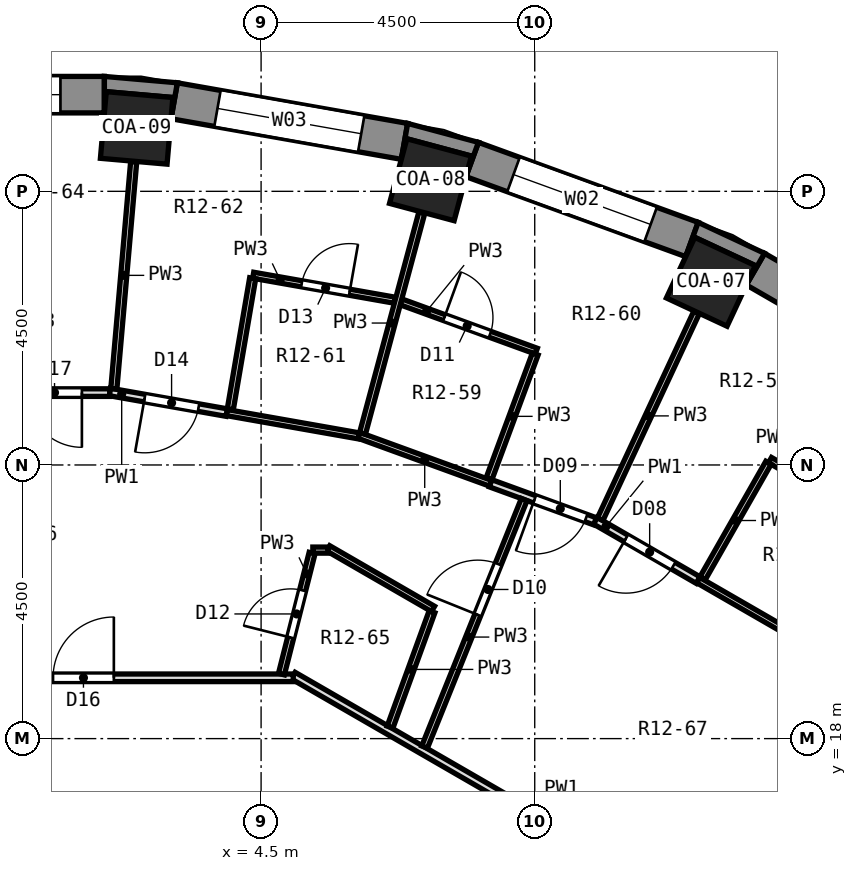
"""IFC4 building model, lengths in metres.
Left out: names, types, materials, properties, quantities, classifications, styles, units other than length and angle.
Written with IfcOpenShell. Run it as: python <this file> out.ifc"""

import sys

from ifc_helpers import new_model, si_unit, direction, frame, frame_2d, origin, origin_2d, place, context, subcontext, project, spatial, polyline, rectangle, outline, extrude, element, fill, save


model = new_model("IFC4")
c1 = context("Model", 3, precision=1e-05, world=origin(), true_north=direction((0.0, 1.0)))
c2 = subcontext(c1, "Body", "Model", "MODEL_VIEW")
j1 = project(units=[si_unit("LENGTHUNIT", "METRE"), si_unit("PLANEANGLEUNIT", "RADIAN")], contexts=[c1])
p1 = place(None, origin())
s1 = spatial("IfcSite", under=j1, at=p1, CompositionType="ELEMENT")
p2 = place(p1, origin())
s2 = spatial("IfcBuilding", under=s1, at=p2, CompositionType="ELEMENT")
p3 = place(p2, frame((0.0, 0.0, 56.0)))
s3 = spatial("IfcBuildingStorey", under=s2, at=p3, CompositionType="ELEMENT", Elevation=56.0)
for number, where, z_axis, x_axis in (
    (1, (11.897, 25.512, 0.0), (0.0, 0.0, 1.0), (0.423, 0.906, 0.0)),
    (2, (7.286, 27.191, 0.0), (0.0, 0.0, 1.0), (0.259, 0.966, 0.0)),
    (3, (2.453, 28.043, 0.0), (0.0, 0.0, 1.0), (0.087, 0.996, 0.0)),
):
    element("IfcColumn", number, at=place(p3, frame(where, z_axis=z_axis, x_axis=x_axis)), inside=s3, PredefinedType="COLUMN", context=c2, shape_type="SweptSolid", body=[
        extrude(rectangle(XDim=1.1, YDim=1.1, at=origin_2d()), origin(), (0.0, 0.0, 1.0), 3.3),
    ])
p4 = place(p3, frame((15.96, 23.798, 0.0), z_axis=(0.0, 0.0, 1.0), x_axis=(-0.86603124159, 0.499989888488, 0.0)))
e4 = element("IfcWall", 4, at=p4, inside=s3, PredefinedType="SOLIDWALL", context=c2, shape_type="SweptSolid", body=[
    extrude(rectangle(XDim=3.846, YDim=0.6, at=frame_2d((1.923, 0.0))), origin(), (0.0, 0.0, 1.0), 2.75),
])
p5 = place(p4, frame((0.723, 0.0, 0.9)))
e5 = element("IfcOpeningElement", 5, at=p5, cuts=e4, PredefinedType="OPENING", context=c2, shape_type="SweptSolid", body=[
    extrude(rectangle(XDim=2.4, YDim=1.8, at=frame_2d((1.2, 0.9))), frame((0.0, 0.312, 0.0), z_axis=(0.0, -1.0, 0.0), x_axis=(1.0, 0.0, 0.0)), (0.0, 0.0, 1.0), 0.624),
])
p6 = place(p3, frame((11.585, 26.208, 0.0), z_axis=(0.0, 0.0, 1.0), x_axis=(-0.939689588564, 0.342028474173, 0.0)))
e6 = element("IfcWall", 6, at=p6, inside=s3, PredefinedType="SOLIDWALL", context=c2, shape_type="SweptSolid", body=[
    extrude(rectangle(XDim=3.846, YDim=0.6, at=frame_2d((1.923, 0.0))), origin(), (0.0, 0.0, 1.0), 2.75),
])
p7 = place(p6, frame((0.723, 0.0, 0.9)))
e7 = element("IfcOpeningElement", 7, at=p7, cuts=e6, PredefinedType="OPENING", context=c2, shape_type="SweptSolid", body=[
    extrude(rectangle(XDim=2.4, YDim=1.8, at=frame_2d((1.2, 0.9))), frame((0.0, 0.312, 0.0), z_axis=(0.0, -1.0, 0.0), x_axis=(1.0, 0.0, 0.0)), (0.0, 0.0, 1.0), 0.624),
])
p8 = place(p3, frame((6.858, 27.821, 0.0), z_axis=(0.0, 0.0, 1.0), x_axis=(-0.984800809218, 0.173687553279, 0.0)))
e8 = element("IfcWall", 8, at=p8, inside=s3, PredefinedType="SOLIDWALL", context=c2, shape_type="SweptSolid", body=[
    extrude(rectangle(XDim=3.846, YDim=0.6, at=frame_2d((1.923, 0.0))), origin(), (0.0, 0.0, 1.0), 2.75),
])
p9 = place(p8, frame((0.723, 0.0, 0.9)))
e9 = element("IfcOpeningElement", 9, at=p9, cuts=e8, PredefinedType="OPENING", context=c2, shape_type="SweptSolid", body=[
    extrude(rectangle(XDim=2.4, YDim=1.8, at=frame_2d((1.2, 0.9))), frame((0.0, 0.312, 0.0), z_axis=(0.0, -1.0, 0.0), x_axis=(1.0, 0.0, 0.0)), (0.0, 0.0, 1.0), 0.624),
])
p10 = place(p3, frame((1.923, 28.59, 0.0), z_axis=(0.0, 0.0, 1.0), x_axis=(-1.0, 0.0, 0.0)))
e10 = element("IfcWall", 10, at=p10, inside=s3, PredefinedType="SOLIDWALL", context=c2, shape_type="SweptSolid", body=[
    extrude(rectangle(XDim=3.846, YDim=0.6, at=frame_2d((1.923, 0.0))), origin(), (0.0, 0.0, 1.0), 2.75),
])
p11 = place(p10, frame((0.723, 0.0, 0.9)))
e11 = element("IfcOpeningElement", 11, at=p11, cuts=e10, PredefinedType="OPENING", context=c2, shape_type="SweptSolid", body=[
    extrude(rectangle(XDim=2.4, YDim=1.8, at=frame_2d((1.2, 0.9))), frame((0.0, 0.312, 0.0), z_axis=(0.0, -1.0, 0.0), x_axis=(1.0, 0.0, 0.0)), (0.0, 0.0, 1.0), 0.624),
])
p12 = place(p3, origin())
e12 = element("IfcWall", 12, at=p12, inside=s3, PredefinedType="SOLIDWALL", context=c2, shape_type="SweptSolid", body=[
    extrude(outline(polyline([(11.688, 26.49), (11.483, 25.926), (11.631, 26.243), (12.628, 25.779), (12.479, 25.461), (12.78, 25.981), (11.688, 26.49)])), origin(), (0.0, 0.0, 1.0), 2.75),
])
p13 = place(p3, origin())
e13 = element("IfcWall", 13, at=p13, inside=s3, PredefinedType="SOLIDWALL", context=c2, shape_type="SweptSolid", body=[
    extrude(outline(polyline([(6.91, 28.117), (6.806, 27.526), (6.897, 27.865), (7.959, 27.58), (7.869, 27.241), (8.074, 27.805), (6.91, 28.117)])), origin(), (0.0, 0.0, 1.0), 2.75),
])
p14 = place(p3, origin())
e14 = element("IfcWall", 14, at=p14, inside=s3, PredefinedType="SOLIDWALL", context=c2, shape_type="SweptSolid", body=[
    extrude(outline(polyline([(3.123, 28.785), (1.923, 28.89), (1.923, 28.29), (1.954, 28.639), (3.049, 28.543), (3.019, 28.194), (3.123, 28.785)])), origin(), (0.0, 0.0, 1.0), 2.75),
])
p15 = place(p3, frame((5.029, 19.036, 0.0), z_axis=(0.0, 0.0, 1.0), x_axis=(0.866024825845, -0.50000100102, 0.0)))
e15 = element("IfcWall", 15, at=p15, inside=s3, PredefinedType="PARTITIONING", context=c2, shape_type="SweptSolid", body=[
    extrude(rectangle(XDim=10.192, YDim=0.125, at=frame_2d((5.096, 0.0))), origin(), (0.0, 0.0, 1.0), 2.75),
])
p16 = place(p3, frame((5.604, 21.129, 0.0), z_axis=(0.0, 0.0, 1.0), x_axis=(0.865901665176, -0.500214260339, 0.0)))
e16 = element("IfcWall", 16, at=p16, inside=s3, PredefinedType="PARTITIONING", context=c2, shape_type="SweptSolid", body=[
    extrude(rectangle(XDim=1.991, YDim=0.1, at=frame_2d((0.996, 0.0))), origin(), (0.0, 0.0, 1.0), 2.75),
])
p17 = place(p3, frame((11.687, 20.607, 0.0), z_axis=(0.0, 0.0, 1.0), x_axis=(0.866150561987, -0.499783156949, 0.0)))
e17 = element("IfcWall", 17, at=p17, inside=s3, PredefinedType="PARTITIONING", context=c2, shape_type="SweptSolid", body=[
    extrude(rectangle(XDim=2.205, YDim=0.1, at=frame_2d((1.103, 0.0))), origin(), (0.0, 0.0, 1.0), 2.75),
])
p18 = place(p3, frame((9.995, 21.584, 0.0), z_axis=(0.0, 0.0, 1.0), x_axis=(0.865996179119, -0.50005061519, 0.0)))
e18 = element("IfcWall", 18, at=p18, inside=s3, PredefinedType="PARTITIONING", context=c2, shape_type="SweptSolid", body=[
    extrude(rectangle(XDim=1.953, YDim=0.125, at=frame_2d((0.977, 0.0))), origin(), (0.0, 0.0, 1.0), 2.75),
])
p19 = place(p18, frame((0.583, 0.0, 0.0)))
e19 = element("IfcOpeningElement", 19, at=p19, cuts=e18, PredefinedType="OPENING", context=c2, shape_type="SweptSolid", body=[
    extrude(rectangle(XDim=0.9, YDim=2.1, at=frame_2d((0.45, 1.05))), frame((0.0, 0.074, 0.0), z_axis=(0.0, -1.0, 0.0), x_axis=(1.0, 0.0, 0.0)), (0.0, 0.0, 1.0), 0.149),
])
p20 = place(p3, frame((12.869, 22.58, 0.0), z_axis=(0.0, 0.0, 1.0), x_axis=(0.866116947413, -0.499841408252, 0.0)))
e20 = element("IfcWall", 20, at=p20, inside=s3, PredefinedType="PARTITIONING", context=c2, shape_type="SweptSolid", body=[
    extrude(rectangle(XDim=2.369, YDim=0.1, at=frame_2d((1.185, 0.0))), origin(), (0.0, 0.0, 1.0), 2.75),
])
p21 = place(p20, frame((0.809, 0.0, 0.0)))
e21 = element("IfcOpeningElement", 21, at=p21, cuts=e20, PredefinedType="OPENING", context=c2, shape_type="SweptSolid", body=[
    extrude(rectangle(XDim=0.8, YDim=2.1, at=frame_2d((0.4, 1.05))), frame((0.0, 0.062, 0.0), z_axis=(0.0, -1.0, 0.0), x_axis=(1.0, 0.0, 0.0)), (0.0, 0.0, 1.0), 0.124),
])
p22 = place(p3, frame((6.107, 22.987, 0.0), z_axis=(0.0, 0.0, 1.0), x_axis=(0.939734670151, -0.34190459154, 0.0)))
e22 = element("IfcWall", 22, at=p22, inside=s3, PredefinedType="PARTITIONING", context=c2, shape_type="SweptSolid", body=[
    extrude(rectangle(XDim=2.306, YDim=0.1, at=frame_2d((1.153, 0.0))), origin(), (0.0, 0.0, 1.0), 2.75),
])
p23 = place(p3, frame((8.274, 22.199, 0.0), z_axis=(0.0, 0.0, 1.0), x_axis=(0.939613884944, -0.342236390848, 0.0)))
e23 = element("IfcWall", 23, at=p23, inside=s3, PredefinedType="PARTITIONING", context=c2, shape_type="SweptSolid", body=[
    extrude(rectangle(XDim=1.828, YDim=0.125, at=frame_2d((0.914, 0.0))), origin(), (0.0, 0.0, 1.0), 2.75),
])
p24 = place(p23, frame((0.77, 0.0, 0.0)))
e24 = element("IfcOpeningElement", 24, at=p24, cuts=e23, PredefinedType="OPENING", context=c2, shape_type="SweptSolid", body=[
    extrude(rectangle(XDim=0.9, YDim=2.1, at=frame_2d((0.45, 1.05))), frame((0.0, 0.074, 0.0), z_axis=(0.0, -1.0, 0.0), x_axis=(1.0, 0.0, 0.0)), (0.0, 0.0, 1.0), 0.149),
])
p25 = place(p3, frame((6.799, 25.183, 0.0), z_axis=(0.0, 0.0, 1.0), x_axis=(0.939651971579, -0.342131805461, 0.0)))
e25 = element("IfcWall", 25, at=p25, inside=s3, PredefinedType="PARTITIONING", context=c2, shape_type="SweptSolid", body=[
    extrude(rectangle(XDim=2.37, YDim=0.1, at=frame_2d((1.185, 0.0))), origin(), (0.0, 0.0, 1.0), 2.75),
])
p26 = place(p25, frame((0.76, 0.0, 0.0)))
e26 = element("IfcOpeningElement", 26, at=p26, cuts=e25, PredefinedType="OPENING", context=c2, shape_type="SweptSolid", body=[
    extrude(rectangle(XDim=0.8, YDim=2.1, at=frame_2d((0.4, 1.05))), frame((0.0, 0.062, 0.0), z_axis=(0.0, -1.0, 0.0), x_axis=(1.0, 0.0, 0.0)), (0.0, 0.0, 1.0), 0.124),
])
p27 = place(p3, frame((3.934, 23.362, 0.0), z_axis=(0.0, 0.0, 1.0), x_axis=(0.984819200986, -0.173583240462, 0.0)))
e27 = element("IfcWall", 27, at=p27, inside=s3, PredefinedType="PARTITIONING", context=c2, shape_type="SweptSolid", body=[
    extrude(rectangle(XDim=2.205, YDim=0.1, at=frame_2d((1.103, 0.0))), origin(), (0.0, 0.0, 1.0), 2.75),
])
p28 = place(p3, frame((2.01, 23.701, 0.0), z_axis=(0.0, 0.0, 1.0), x_axis=(0.984788592159, -0.173756809228, 0.0)))
e28 = element("IfcWall", 28, at=p28, inside=s3, PredefinedType="PARTITIONING", context=c2, shape_type="SweptSolid", body=[
    extrude(rectangle(XDim=1.953, YDim=0.125, at=frame_2d((0.977, 0.0))), origin(), (0.0, 0.0, 1.0), 2.75),
])
p29 = place(p28, frame((0.583, 0.0, 0.0)))
e29 = element("IfcOpeningElement", 29, at=p29, cuts=e28, PredefinedType="OPENING", context=c2, shape_type="SweptSolid", body=[
    extrude(rectangle(XDim=0.9, YDim=2.1, at=frame_2d((0.45, 1.05))), frame((0.0, 0.074, 0.0), z_axis=(0.0, -1.0, 0.0), x_axis=(1.0, 0.0, 0.0)), (0.0, 0.0, 1.0), 0.149),
])
p30 = place(p3, frame((4.37, 25.62, 0.0), z_axis=(0.0, 0.0, 1.0), x_axis=(0.984804303523, -0.173667739554, 0.0)))
e30 = element("IfcWall", 30, at=p30, inside=s3, PredefinedType="PARTITIONING", context=c2, shape_type="SweptSolid", body=[
    extrude(rectangle(XDim=2.369, YDim=0.1, at=frame_2d((1.184, 0.0))), origin(), (0.0, 0.0, 1.0), 2.75),
])
p31 = place(p30, frame((0.809, 0.0, 0.0)))
e31 = element("IfcOpeningElement", 31, at=p31, cuts=e30, PredefinedType="OPENING", context=c2, shape_type="SweptSolid", body=[
    extrude(rectangle(XDim=0.8, YDim=2.1, at=frame_2d((0.4, 1.05))), frame((0.0, 0.062, 0.0), z_axis=(0.0, -1.0, 0.0), x_axis=(1.0, 0.0, 0.0)), (0.0, 0.0, 1.0), 0.124),
])
p32 = place(p3, frame((-5.163, 19.0, 0.0), z_axis=(0.0, 0.0, 1.0), x_axis=(1.0, 0.0, 0.0)))
e32 = element("IfcWall", 32, at=p32, inside=s3, PredefinedType="PARTITIONING", context=c2, shape_type="SweptSolid", body=[
    extrude(rectangle(XDim=10.192, YDim=0.125, at=frame_2d((5.096, 0.0))), origin(), (0.0, 0.0, 1.0), 2.75),
])
p33 = place(p32, frame((6.242, 0.0, 0.0)))
e33 = element("IfcOpeningElement", 33, at=p33, cuts=e32, PredefinedType="OPENING", context=c2, shape_type="SweptSolid", body=[
    extrude(rectangle(XDim=1.0, YDim=2.1, at=frame_2d((0.5, 1.05))), frame((0.0, 0.074, 0.0), z_axis=(0.0, -1.0, 0.0), x_axis=(1.0, 0.0, 0.0)), (0.0, 0.0, 1.0), 0.149),
])
p34 = place(p3, frame((5.351, 21.1, 0.0), z_axis=(0.0, 0.0, 1.0), x_axis=(1.0, 0.0, 0.0)))
e34 = element("IfcWall", 34, at=p34, inside=s3, PredefinedType="PARTITIONING", context=c2, shape_type="SweptSolid", body=[
    extrude(rectangle(XDim=0.253, YDim=0.1, at=frame_2d((0.126, 0.0))), origin(), (0.0, 0.0, 1.0), 2.75),
])
p35 = place(p3, frame((0.183, 23.69, 0.0), z_axis=(0.0, 0.0, 1.0), x_axis=(1.0, 0.0, 0.0)))
e35 = element("IfcWall", 35, at=p35, inside=s3, PredefinedType="PARTITIONING", context=c2, shape_type="SweptSolid", body=[
    extrude(rectangle(XDim=1.827, YDim=0.125, at=frame_2d((0.914, 0.0))), origin(), (0.0, 0.0, 1.0), 2.75),
])
p36 = place(p35, frame((0.47, 0.0, 0.0)))
e36 = element("IfcOpeningElement", 36, at=p36, cuts=e35, PredefinedType="OPENING", context=c2, shape_type="SweptSolid", body=[
    extrude(rectangle(XDim=0.9, YDim=2.1, at=frame_2d((0.45, 1.05))), frame((0.0, 0.074, 0.0), z_axis=(0.0, -1.0, 0.0), x_axis=(1.0, 0.0, 0.0)), (0.0, 0.0, 1.0), 0.149),
])
p37 = place(p3, frame((11.761, 20.636, 0.0), z_axis=(0.0, 0.0, 1.0), x_axis=(0.495213152806, 0.868771508101, 0.0)))
e37 = element("IfcWall", 37, at=p37, inside=s3, PredefinedType="PARTITIONING", context=c2, shape_type="SweptSolid", body=[
    extrude(rectangle(XDim=2.188, YDim=0.1, at=frame_2d((1.094, 0.0))), origin(), (0.0, 0.0, 1.0), 2.75),
])
p38 = place(p3, frame((10.077, 21.608, 0.0), z_axis=(0.0, 0.0, 1.0), x_axis=(0.422418199687, 0.906401050624, 0.0)))
e38 = element("IfcWall", 38, at=p38, inside=s3, PredefinedType="PARTITIONING", context=c2, shape_type="SweptSolid", body=[
    extrude(rectangle(XDim=3.748, YDim=0.1, at=frame_2d((1.874, 0.0))), origin(), (0.0, 0.0, 1.0), 2.75),
])
p39 = place(p3, frame((7.188, 17.861, 0.0), z_axis=(0.0, 0.0, 1.0), x_axis=(0.373452567141, 0.927649276449, 0.0)))
e39 = element("IfcWall", 39, at=p39, inside=s3, PredefinedType="PARTITIONING", context=c2, shape_type="SweptSolid", body=[
    extrude(rectangle(XDim=4.387, YDim=0.1, at=frame_2d((2.194, 0.0))), origin(), (0.0, 0.0, 1.0), 2.75),
])
p40 = place(p39, frame((2.344, 0.0, 0.0)))
e40 = element("IfcOpeningElement", 40, at=p40, cuts=e39, PredefinedType="OPENING", context=c2, shape_type="SweptSolid", body=[
    extrude(rectangle(XDim=0.9, YDim=2.1, at=frame_2d((0.45, 1.05))), frame((0.0, 0.062, 0.0), z_axis=(0.0, -1.0, 0.0), x_axis=(1.0, 0.0, 0.0)), (0.0, 0.0, 1.0), 0.124),
])
p41 = place(p3, frame((8.249, 22.275, 0.0), z_axis=(0.0, 0.0, 1.0), x_axis=(0.347437983371, 0.937702963476, 0.0)))
e41 = element("IfcWall", 41, at=p41, inside=s3, PredefinedType="PARTITIONING", context=c2, shape_type="SweptSolid", body=[
    extrude(rectangle(XDim=2.187, YDim=0.1, at=frame_2d((1.093, 0.0))), origin(), (0.0, 0.0, 1.0), 2.75),
])
p42 = place(p3, frame((6.62, 18.189, 0.0), z_axis=(0.0, 0.0, 1.0), x_axis=(0.341976076059, 0.939708658789, 0.0)))
e42 = element("IfcWall", 42, at=p42, inside=s3, PredefinedType="PARTITIONING", context=c2, shape_type="SweptSolid", body=[
    extrude(rectangle(XDim=2.019, YDim=0.1, at=frame_2d((1.01, 0.0))), origin(), (0.0, 0.0, 1.0), 2.75),
])
p43 = place(p3, frame((6.168, 23.018, 0.0), z_axis=(0.0, 0.0, 1.0), x_axis=(0.259367918518, 0.965778588934, 0.0)))
e43 = element("IfcWall", 43, at=p43, inside=s3, PredefinedType="PARTITIONING", context=c2, shape_type="SweptSolid", body=[
    extrude(rectangle(XDim=3.76, YDim=0.1, at=frame_2d((1.88, 0.0))), origin(), (0.0, 0.0, 1.0), 2.75),
])
p44 = place(p3, frame((4.834, 19.061, 0.0), z_axis=(0.0, 0.0, 1.0), x_axis=(0.245583064142, 0.969375550861, 0.0)))
e44 = element("IfcWall", 44, at=p44, inside=s3, PredefinedType="PARTITIONING", context=c2, shape_type="SweptSolid", body=[
    extrude(rectangle(XDim=2.054, YDim=0.1, at=frame_2d((1.027, 0.0))), origin(), (0.0, 0.0, 1.0), 2.75),
])
p45 = place(p44, frame((0.621, 0.0, 0.0)))
e45 = element("IfcOpeningElement", 45, at=p45, cuts=e44, PredefinedType="OPENING", context=c2, shape_type="SweptSolid", body=[
    extrude(rectangle(XDim=0.8, YDim=2.1, at=frame_2d((0.4, 1.05))), frame((0.0, 0.062, 0.0), z_axis=(0.0, -1.0, 0.0), x_axis=(1.0, 0.0, 0.0)), (0.0, 0.0, 1.0), 0.124),
])
p46 = place(p3, frame((3.993, 23.415, 0.0), z_axis=(0.0, 0.0, 1.0), x_axis=(0.1683070432, 0.985734619058, 0.0)))
e46 = element("IfcWall", 46, at=p46, inside=s3, PredefinedType="PARTITIONING", context=c2, shape_type="SweptSolid", body=[
    extrude(rectangle(XDim=2.188, YDim=0.1, at=frame_2d((1.094, 0.0))), origin(), (0.0, 0.0, 1.0), 2.75),
])
p47 = place(p3, frame((2.078, 23.752, 0.0), z_axis=(0.0, 0.0, 1.0), x_axis=(0.087045714137, 0.996204318225, 0.0)))
e47 = element("IfcWall", 47, at=p47, inside=s3, PredefinedType="PARTITIONING", context=c2, shape_type="SweptSolid", body=[
    extrude(rectangle(XDim=3.747, YDim=0.1, at=frame_2d((1.874, 0.0))), origin(), (0.0, 0.0, 1.0), 2.75),
])
p48 = place(p7, origin())
e48 = element("IfcWindow", 48, at=p48, inside=s3, PartitioningType="SINGLE_PANEL", PredefinedType="WINDOW", context=c2, shape_type="SweptSolid", body=[
    extrude(rectangle(XDim=2.4, YDim=1.8, at=frame_2d((1.2, 0.9))), frame((0.0, 0.18, 0.0), z_axis=(0.0, -1.0, 0.0), x_axis=(1.0, 0.0, 0.0)), (0.0, 0.0, 1.0), 0.06),
])
fill(e7, e48)
p49 = place(p9, origin())
e49 = element("IfcWindow", 49, at=p49, inside=s3, PartitioningType="SINGLE_PANEL", PredefinedType="WINDOW", context=c2, shape_type="SweptSolid", body=[
    extrude(rectangle(XDim=2.4, YDim=1.8, at=frame_2d((1.2, 0.9))), frame((0.0, 0.18, 0.0), z_axis=(0.0, -1.0, 0.0), x_axis=(1.0, 0.0, 0.0)), (0.0, 0.0, 1.0), 0.06),
])
fill(e9, e49)
p50 = place(p11, origin())
e50 = element("IfcWindow", 50, at=p50, inside=s3, PartitioningType="SINGLE_PANEL", PredefinedType="WINDOW", context=c2, shape_type="SweptSolid", body=[
    extrude(rectangle(XDim=2.4, YDim=1.8, at=frame_2d((1.2, 0.9))), frame((0.0, 0.18, 0.0), z_axis=(0.0, -1.0, 0.0), x_axis=(1.0, 0.0, 0.0)), (0.0, 0.0, 1.0), 0.06),
])
fill(e11, e50)
p51 = place(p19, frame((0.9, 0.0, 0.0), z_axis=(0.0, 0.0, 1.0), x_axis=(-1.0, 0.0, 0.0)))
e51 = element("IfcDoor", 51, at=p51, inside=s3, OperationType="SINGLE_SWING_RIGHT", PredefinedType="DOOR", context=c2, shape_type="SweptSolid", body=[
    extrude(rectangle(XDim=0.9, YDim=2.1, at=frame_2d((0.45, 1.05))), frame((0.0, 0.025, 0.0), z_axis=(0.0, -1.0, 0.0), x_axis=(1.0, 0.0, 0.0)), (0.0, 0.0, 1.0), 0.05),
])
fill(e19, e51)
p52 = place(p24, frame((0.9, 0.0, 0.0), z_axis=(0.0, 0.0, 1.0), x_axis=(-1.0, 0.0, 0.0)))
e52 = element("IfcDoor", 52, at=p52, inside=s3, OperationType="SINGLE_SWING_RIGHT", PredefinedType="DOOR", context=c2, shape_type="SweptSolid", body=[
    extrude(rectangle(XDim=0.9, YDim=2.1, at=frame_2d((0.45, 1.05))), frame((0.0, 0.025, 0.0), z_axis=(0.0, -1.0, 0.0), x_axis=(1.0, 0.0, 0.0)), (0.0, 0.0, 1.0), 0.05),
])
fill(e24, e52)
p53 = place(p40, origin())
e53 = element("IfcDoor", 53, at=p53, inside=s3, OperationType="SINGLE_SWING_LEFT", PredefinedType="DOOR", context=c2, shape_type="SweptSolid", body=[
    extrude(rectangle(XDim=0.9, YDim=2.1, at=frame_2d((0.45, 1.05))), frame((0.0, 0.025, 0.0), z_axis=(0.0, -1.0, 0.0), x_axis=(1.0, 0.0, 0.0)), (0.0, 0.0, 1.0), 0.05),
])
fill(e40, e53)
p54 = place(p26, origin())
e54 = element("IfcDoor", 54, at=p54, inside=s3, OperationType="SINGLE_SWING_LEFT", PredefinedType="DOOR", context=c2, shape_type="SweptSolid", body=[
    extrude(rectangle(XDim=0.8, YDim=2.1, at=frame_2d((0.4, 1.05))), frame((0.0, 0.025, 0.0), z_axis=(0.0, -1.0, 0.0), x_axis=(1.0, 0.0, 0.0)), (0.0, 0.0, 1.0), 0.05),
])
fill(e26, e54)
p55 = place(p45, origin())
e55 = element("IfcDoor", 55, at=p55, inside=s3, OperationType="SINGLE_SWING_LEFT", PredefinedType="DOOR", context=c2, shape_type="SweptSolid", body=[
    extrude(rectangle(XDim=0.8, YDim=2.1, at=frame_2d((0.4, 1.05))), frame((0.0, 0.025, 0.0), z_axis=(0.0, -1.0, 0.0), x_axis=(1.0, 0.0, 0.0)), (0.0, 0.0, 1.0), 0.05),
])
fill(e45, e55)
p56 = place(p31, origin())
e56 = element("IfcDoor", 56, at=p56, inside=s3, OperationType="SINGLE_SWING_RIGHT", PredefinedType="DOOR", context=c2, shape_type="SweptSolid", body=[
    extrude(rectangle(XDim=0.8, YDim=2.1, at=frame_2d((0.4, 1.05))), frame((0.0, 0.025, 0.0), z_axis=(0.0, -1.0, 0.0), x_axis=(1.0, 0.0, 0.0)), (0.0, 0.0, 1.0), 0.05),
])
fill(e31, e56)
p57 = place(p29, frame((0.9, 0.0, 0.0), z_axis=(0.0, 0.0, 1.0), x_axis=(-1.0, 0.0, 0.0)))
e57 = element("IfcDoor", 57, at=p57, inside=s3, OperationType="SINGLE_SWING_RIGHT", PredefinedType="DOOR", context=c2, shape_type="SweptSolid", body=[
    extrude(rectangle(XDim=0.9, YDim=2.1, at=frame_2d((0.45, 1.05))), frame((0.0, 0.025, 0.0), z_axis=(0.0, -1.0, 0.0), x_axis=(1.0, 0.0, 0.0)), (0.0, 0.0, 1.0), 0.05),
])
fill(e29, e57)
p58 = place(p33, origin())
e58 = element("IfcDoor", 58, at=p58, inside=s3, OperationType="SINGLE_SWING_RIGHT", PredefinedType="DOOR", context=c2, shape_type="SweptSolid", body=[
    extrude(rectangle(XDim=1.0, YDim=2.1, at=frame_2d((0.5, 1.05))), frame((0.0, 0.025, 0.0), z_axis=(0.0, -1.0, 0.0), x_axis=(1.0, 0.0, 0.0)), (0.0, 0.0, 1.0), 0.05),
])
fill(e33, e58)
p59 = place(p36, frame((0.9, 0.0, 0.0), z_axis=(0.0, 0.0, 1.0), x_axis=(-1.0, 0.0, 0.0)))
e59 = element("IfcDoor", 59, at=p59, inside=s3, OperationType="SINGLE_SWING_LEFT", PredefinedType="DOOR", context=c2, shape_type="SweptSolid", body=[
    extrude(rectangle(XDim=0.9, YDim=2.1, at=frame_2d((0.45, 1.05))), frame((0.0, 0.025, 0.0), z_axis=(0.0, -1.0, 0.0), x_axis=(1.0, 0.0, 0.0)), (0.0, 0.0, 1.0), 0.05),
])
fill(e36, e59)
save(model, sys.argv[1])
